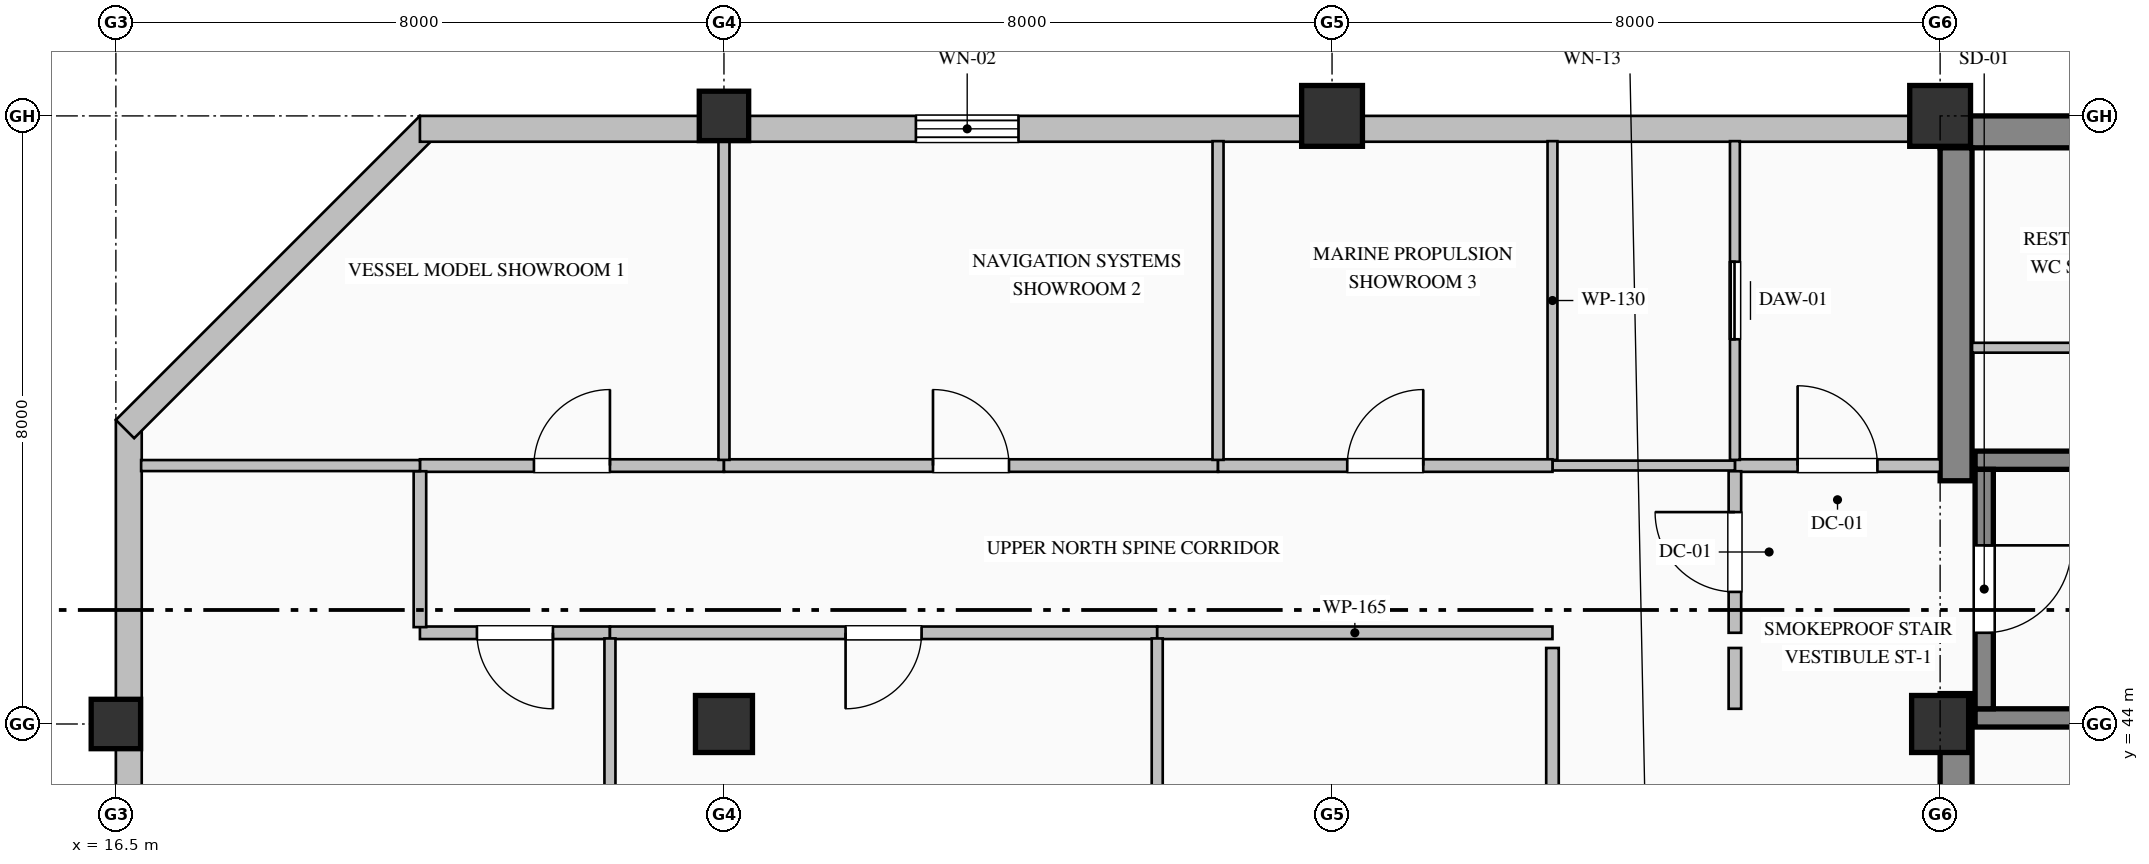
"""IFC4 building model, lengths in metres.
Left out: names, types, materials, properties, quantities, classifications, styles, units other than length and angle.
Written with IfcOpenShell. Run it as: python <this file> out.ifc"""

import sys

from ifc_helpers import new_model, si_unit, direction, frame, frame_2d, origin, origin_2d, place, context, subcontext, project, spatial, rectangle, hollow_rectangle, extrude, element, fill, save


model = new_model("IFC4")
c1 = context("Model", 3, precision=1e-05, world=origin(), true_north=direction((0.0, 1.0)))
c2 = subcontext(c1, "Body", "Model", "MODEL_VIEW")
j1 = project(units=[si_unit("LENGTHUNIT", "METRE"), si_unit("PLANEANGLEUNIT", "RADIAN")], contexts=[c1])
p1 = place(None, origin())
s1 = spatial("IfcSite", under=j1, at=p1, CompositionType="ELEMENT")
p2 = place(p1, origin())
s2 = spatial("IfcBuilding", under=s1, at=p2, CompositionType="ELEMENT")
p3 = place(p2, frame((0.0, 0.0, 355.2)))
s3 = spatial("IfcBuildingStorey", under=s2, at=p3, CompositionType="ELEMENT", Elevation=355.2)
p4 = place(p3, frame((40.5, 51.79, 0.0), z_axis=(0.0, 0.0, 1.0), x_axis=(1.0, 0.0, 0.0)))
e1 = element("IfcWall", 1, at=p4, inside=s3, PredefinedType="SHEAR", context=c2, shape_type="SweptSolid", body=[
    extrude(rectangle(XDim=23.5, YDim=0.42, at=frame_2d((11.75, 0.0))), origin(), (0.0, 0.0, 1.0), 3.785),
])
p5 = place(p3, frame((40.71, 36.42, 0.0), z_axis=(0.0, 0.0, 1.0), x_axis=(0.0, 1.0, 0.0)))
e2 = element("IfcWall", 2, at=p5, inside=s3, PredefinedType="SHEAR", context=c2, shape_type="SweptSolid", body=[
    extrude(rectangle(XDim=7.98, YDim=0.42, at=frame_2d((3.99, 0.0))), origin(), (0.0, 0.0, 1.0), 3.785),
])
p6 = place(p3, frame((40.71, 47.2, 0.0), z_axis=(0.0, 0.0, 1.0), x_axis=(0.0, 1.0, 0.0)))
e3 = element("IfcWall", 3, at=p6, inside=s3, PredefinedType="SHEAR", context=c2, shape_type="SweptSolid", body=[
    extrude(rectangle(XDim=4.38, YDim=0.42, at=frame_2d((2.19, 0.0))), origin(), (0.0, 0.0, 1.0), 3.785),
])
p7 = place(p3, frame((16.5, 44.0, 0.0), z_axis=(0.0, 0.0, 1.0), x_axis=(1.0, 0.0, 0.0)))
e4 = element("IfcColumn", 4, at=p7, inside=s3, PredefinedType="COLUMN", context=c2, shape_type="SweptSolid", body=[
    extrude(hollow_rectangle(XDim=0.65, YDim=0.65, WallThickness=0.028, at=origin_2d()), origin(), (0.0, 0.0, 1.0), 4.0),
])
p8 = place(p3, frame((24.5, 44.0, 0.0), z_axis=(0.0, 0.0, 1.0), x_axis=(1.0, 0.0, 0.0)))
e5 = element("IfcColumn", 5, at=p8, inside=s3, PredefinedType="COLUMN", context=c2, shape_type="SweptSolid", body=[
    extrude(rectangle(XDim=0.75, YDim=0.75, at=origin_2d()), origin(), (0.0, 0.0, 1.0), 4.0),
])
p9 = place(p3, frame((24.5, 52.0, 0.0), z_axis=(0.0, 0.0, 1.0), x_axis=(1.0, 0.0, 0.0)))
e6 = element("IfcColumn", 6, at=p9, inside=s3, PredefinedType="COLUMN", context=c2, shape_type="SweptSolid", body=[
    extrude(hollow_rectangle(XDim=0.65, YDim=0.65, WallThickness=0.028, at=origin_2d()), origin(), (0.0, 0.0, 1.0), 4.0),
])
p10 = place(p3, frame((32.5, 52.0, 0.0), z_axis=(0.0, 0.0, 1.0), x_axis=(1.0, 0.0, 0.0)))
e7 = element("IfcColumn", 7, at=p10, inside=s3, PredefinedType="COLUMN", context=c2, shape_type="SweptSolid", body=[
    extrude(hollow_rectangle(XDim=0.8, YDim=0.8, WallThickness=0.032, at=origin_2d()), origin(), (0.0, 0.0, 1.0), 4.0),
])
p11 = place(p3, frame((40.5, 44.0, 0.0), z_axis=(0.0, 0.0, 1.0), x_axis=(1.0, 0.0, 0.0)))
e8 = element("IfcColumn", 8, at=p11, inside=s3, PredefinedType="COLUMN", context=c2, shape_type="SweptSolid", body=[
    extrude(rectangle(XDim=0.75, YDim=0.75, at=origin_2d()), origin(), (0.0, 0.0, 1.0), 4.0),
])
p12 = place(p3, frame((40.5, 52.0, 0.0), z_axis=(0.0, 0.0, 1.0), x_axis=(1.0, 0.0, 0.0)))
e9 = element("IfcColumn", 9, at=p12, inside=s3, PredefinedType="COLUMN", context=c2, shape_type="SweptSolid", body=[
    extrude(hollow_rectangle(XDim=0.8, YDim=0.8, WallThickness=0.032, at=origin_2d()), origin(), (0.0, 0.0, 1.0), 4.0),
])
p13 = place(p3, frame((16.67, 32.0, 0.0), z_axis=(0.0, 0.0, 1.0), x_axis=(0.0, 1.0, 0.0)))
e10 = element("IfcWall", 10, at=p13, inside=s3, PredefinedType="SOLIDWALL", context=c2, shape_type="SweptSolid", body=[
    extrude(rectangle(XDim=16.0, YDim=0.34, at=frame_2d((8.0, 0.0))), origin(), (0.0, 0.0, 1.0), 3.335),
])
p14 = place(p13, frame((6.725, 0.0, 0.9)))
e11 = element("IfcOpeningElement", 11, at=p14, cuts=e10, PredefinedType="OPENING", context=c2, shape_type="SweptSolid", body=[
    extrude(rectangle(XDim=0.95, YDim=1.85, at=frame_2d((0.475, 0.925))), frame((0.0, 0.18, 0.0), z_axis=(0.0, -1.0, 0.0), x_axis=(1.0, 0.0, 0.0)), (0.0, 0.0, 1.0), 0.36),
])
p15 = place(p3, frame((16.62, 47.88, 0.0), z_axis=(0.0, 0.0, 1.0), x_axis=(0.707106781187, 0.707106781187, 0.0)))
e12 = element("IfcWall", 12, at=p15, inside=s3, PredefinedType="SOLIDWALL", context=c2, shape_type="SweptSolid", body=[
    extrude(rectangle(XDim=5.657, YDim=0.34, at=frame_2d((2.828, 0.0))), origin(), (0.0, 0.0, 1.0), 3.785),
])
p16 = place(p3, frame((20.5, 51.83, 0.0), z_axis=(0.0, 0.0, 1.0), x_axis=(1.0, 0.0, 0.0)))
e13 = element("IfcWall", 13, at=p16, inside=s3, PredefinedType="SOLIDWALL", context=c2, shape_type="SweptSolid", body=[
    extrude(rectangle(XDim=20.02, YDim=0.34, at=frame_2d((10.01, 0.0))), origin(), (0.0, 0.0, 1.0), 3.335),
])
p17 = place(p16, frame((6.525, 0.0, 0.9)))
e14 = element("IfcOpeningElement", 14, at=p17, cuts=e13, PredefinedType="OPENING", context=c2, shape_type="SweptSolid", body=[
    extrude(rectangle(XDim=1.35, YDim=1.85, at=frame_2d((0.675, 0.925))), frame((0.0, 0.18, 0.0), z_axis=(0.0, -1.0, 0.0), x_axis=(1.0, 0.0, 0.0)), (0.0, 0.0, 1.0), 0.36),
])
for number, where, z_axis, x_axis in (
    (15, (40.96, 47.47, 0.0), (0.0, 0.0, 1.0), (1.0, 0.0, 0.0)),
    (16, (49.04, 44.08, 0.0), (0.0, 0.0, 1.0), (-1.0, 0.0, 0.0)),
):
    element("IfcWall", number, at=place(p3, frame(where, z_axis=z_axis, x_axis=x_axis)), inside=s3, PredefinedType="SOLIDWALL", context=c2, shape_type="SweptSolid", body=[
        extrude(rectangle(XDim=8.08, YDim=0.24, at=frame_2d((4.04, 0.0))), origin(), (0.0, 0.0, 1.0), 4.0),
    ])
p18 = place(p3, frame((41.08, 47.35, 0.0), z_axis=(0.0, 0.0, 1.0), x_axis=(0.0, -1.0, 0.0)))
e17 = element("IfcWall", 17, at=p18, inside=s3, PredefinedType="SOLIDWALL", context=c2, shape_type="SweptSolid", body=[
    extrude(rectangle(XDim=3.15, YDim=0.24, at=frame_2d((1.575, 0.0))), origin(), (0.0, 0.0, 1.0), 4.0),
])
p19 = place(p18, frame((1.0, 0.0, 0.0)))
e18 = element("IfcOpeningElement", 18, at=p19, cuts=e17, PredefinedType="OPENING", context=c2, shape_type="SweptSolid", body=[
    extrude(rectangle(XDim=1.15, YDim=2.2, at=frame_2d((0.575, 1.1))), frame((0.0, 0.13, 0.0), z_axis=(0.0, -1.0, 0.0), x_axis=(1.0, 0.0, 0.0)), (0.0, 0.0, 1.0), 0.26),
])
p20 = place(p3, frame((37.8, 47.4, 0.0), z_axis=(0.0, 0.0, 1.0), x_axis=(1.0, 0.0, 0.0)))
e19 = element("IfcWall", 19, at=p20, inside=s3, PredefinedType="PARTITIONING", context=c2, shape_type="SweptSolid", body=[
    extrude(rectangle(XDim=2.7, YDim=0.165, at=frame_2d((1.35, 0.0))), origin(), (0.0, 0.0, 1.0), 3.785),
])
p21 = place(p20, frame((0.825, 0.0, 0.0)))
e20 = element("IfcOpeningElement", 20, at=p21, cuts=e19, PredefinedType="OPENING", context=c2, shape_type="SweptSolid", body=[
    extrude(rectangle(XDim=1.05, YDim=2.15, at=frame_2d((0.525, 1.075))), frame((0.0, 0.093, 0.0), z_axis=(0.0, -1.0, 0.0), x_axis=(1.0, 0.0, 0.0)), (0.0, 0.0, 1.0), 0.185),
])
p22 = place(p3, frame((37.8, 45.2, 0.0), z_axis=(0.0, 0.0, 1.0), x_axis=(0.0, 1.0, 0.0)))
e21 = element("IfcWall", 21, at=p22, inside=s3, PredefinedType="PARTITIONING", context=c2, shape_type="SweptSolid", body=[
    extrude(rectangle(XDim=2.125, YDim=0.165, at=frame_2d((1.063, 0.0))), origin(), (0.0, 0.0, 1.0), 3.785),
])
p23 = place(p22, frame((0.538, 0.0, 0.0)))
e22 = element("IfcOpeningElement", 22, at=p23, cuts=e21, PredefinedType="OPENING", context=c2, shape_type="SweptSolid", body=[
    extrude(rectangle(XDim=1.05, YDim=2.15, at=frame_2d((0.525, 1.075))), frame((0.0, 0.093, 0.0), z_axis=(0.0, -1.0, 0.0), x_axis=(1.0, 0.0, 0.0)), (0.0, 0.0, 1.0), 0.185),
])
p24 = place(p3, frame((37.8, 44.2, 0.0), z_axis=(0.0, 0.0, 1.0), x_axis=(0.0, 1.0, 0.0)))
e23 = element("IfcWall", 23, at=p24, inside=s3, PredefinedType="PARTITIONING", context=c2, shape_type="SweptSolid", body=[
    extrude(rectangle(XDim=0.8, YDim=0.165, at=frame_2d((0.4, 0.0))), origin(), (0.0, 0.0, 1.0), 3.785),
])
p25 = place(p3, frame((37.8, 47.475, 0.0), z_axis=(0.0, 0.0, 1.0), x_axis=(0.0, 1.0, 0.0)))
e24 = element("IfcWall", 24, at=p25, inside=s3, PredefinedType="PARTITIONING", context=c2, shape_type="SweptSolid", body=[
    extrude(rectangle(XDim=4.193, YDim=0.13, at=frame_2d((2.097, 0.0))), origin(), (0.0, 0.0, 1.0), 3.785),
])
p26 = place(p25, frame((1.587, 0.0, 0.0)))
e25 = element("IfcOpeningElement", 25, at=p26, cuts=e24, PredefinedType="OPENING", context=c2, shape_type="SweptSolid", body=[
    extrude(rectangle(XDim=1.02, YDim=2.15, at=frame_2d((0.51, 1.075))), frame((0.0, 0.075, 0.0), z_axis=(0.0, -1.0, 0.0), x_axis=(1.0, 0.0, 0.0)), (0.0, 0.0, 1.0), 0.15),
])
p27 = place(p3, frame((37.8, 47.4, 0.0), z_axis=(0.0, 0.0, 1.0), x_axis=(-1.0, 0.0, 0.0)))
e26 = element("IfcWall", 26, at=p27, inside=s3, PredefinedType="PARTITIONING", context=c2, shape_type="SweptSolid", body=[
    extrude(rectangle(XDim=2.4, YDim=0.13, at=frame_2d((1.2, 0.0))), origin(), (0.0, 0.0, 1.0), 3.785),
])
p28 = place(p3, frame((35.4, 47.475, 0.0), z_axis=(0.0, 0.0, 1.0), x_axis=(0.0, 1.0, 0.0)))
e27 = element("IfcWall", 27, at=p28, inside=s3, PredefinedType="PARTITIONING", context=c2, shape_type="SweptSolid", body=[
    extrude(rectangle(XDim=4.193, YDim=0.13, at=frame_2d((2.097, 0.0))), origin(), (0.0, 0.0, 1.0), 3.785),
])
p29 = place(p3, frame((40.92, 48.95, 0.0), z_axis=(0.0, 0.0, 1.0), x_axis=(1.0, 0.0, 0.0)))
e28 = element("IfcWall", 28, at=p29, inside=s3, PredefinedType="PARTITIONING", context=c2, shape_type="SweptSolid", body=[
    extrude(rectangle(XDim=5.88, YDim=0.13, at=frame_2d((2.94, 0.0))), origin(), (0.0, 0.0, 1.0), 3.785),
])
p30 = place(p29, frame((2.48, 0.0, 0.0)))
e29 = element("IfcOpeningElement", 29, at=p30, cuts=e28, PredefinedType="OPENING", context=c2, shape_type="SweptSolid", body=[
    extrude(rectangle(XDim=0.92, YDim=2.15, at=frame_2d((0.46, 1.075))), frame((0.0, 0.075, 0.0), z_axis=(0.0, -1.0, 0.0), x_axis=(1.0, 0.0, 0.0)), (0.0, 0.0, 1.0), 0.15),
])
p31 = place(p3, frame((20.5, 47.4, 0.0), z_axis=(0.0, 0.0, 1.0), x_axis=(1.0, 0.0, 0.0)))
e30 = element("IfcWall", 30, at=p31, inside=s3, PredefinedType="PARTITIONING", context=c2, shape_type="SweptSolid", body=[
    extrude(rectangle(XDim=4.0, YDim=0.165, at=frame_2d((2.0, 0.0))), origin(), (0.0, 0.0, 1.0), 3.785),
])
p32 = place(p31, frame((1.5, 0.0, 0.0)))
e31 = element("IfcOpeningElement", 31, at=p32, cuts=e30, PredefinedType="OPENING", context=c2, shape_type="SweptSolid", body=[
    extrude(rectangle(XDim=1.0, YDim=2.15, at=frame_2d((0.5, 1.075))), frame((0.0, 0.093, 0.0), z_axis=(0.0, -1.0, 0.0), x_axis=(1.0, 0.0, 0.0)), (0.0, 0.0, 1.0), 0.185),
])
p33 = place(p3, frame((24.5, 47.4, 0.0), z_axis=(0.0, 0.0, 1.0), x_axis=(1.0, 0.0, 0.0)))
e32 = element("IfcWall", 32, at=p33, inside=s3, PredefinedType="PARTITIONING", context=c2, shape_type="SweptSolid", body=[
    extrude(rectangle(XDim=6.5, YDim=0.165, at=frame_2d((3.25, 0.0))), origin(), (0.0, 0.0, 1.0), 3.785),
])
p34 = place(p33, frame((2.75, 0.0, 0.0)))
e33 = element("IfcOpeningElement", 33, at=p34, cuts=e32, PredefinedType="OPENING", context=c2, shape_type="SweptSolid", body=[
    extrude(rectangle(XDim=1.0, YDim=2.15, at=frame_2d((0.5, 1.075))), frame((0.0, 0.093, 0.0), z_axis=(0.0, -1.0, 0.0), x_axis=(1.0, 0.0, 0.0)), (0.0, 0.0, 1.0), 0.185),
])
p35 = place(p3, frame((31.0, 47.4, 0.0), z_axis=(0.0, 0.0, 1.0), x_axis=(1.0, 0.0, 0.0)))
e34 = element("IfcWall", 34, at=p35, inside=s3, PredefinedType="PARTITIONING", context=c2, shape_type="SweptSolid", body=[
    extrude(rectangle(XDim=4.4, YDim=0.165, at=frame_2d((2.2, 0.0))), origin(), (0.0, 0.0, 1.0), 3.785),
])
p36 = place(p35, frame((1.7, 0.0, 0.0)))
e35 = element("IfcOpeningElement", 35, at=p36, cuts=e34, PredefinedType="OPENING", context=c2, shape_type="SweptSolid", body=[
    extrude(rectangle(XDim=1.0, YDim=2.15, at=frame_2d((0.5, 1.075))), frame((0.0, 0.093, 0.0), z_axis=(0.0, -1.0, 0.0), x_axis=(1.0, 0.0, 0.0)), (0.0, 0.0, 1.0), 0.185),
])
p37 = place(p3, frame((23.0, 45.2, 0.0), z_axis=(0.0, 0.0, 1.0), x_axis=(-1.0, 0.0, 0.0)))
e36 = element("IfcWall", 36, at=p37, inside=s3, PredefinedType="PARTITIONING", context=c2, shape_type="SweptSolid", body=[
    extrude(rectangle(XDim=2.5, YDim=0.165, at=frame_2d((1.25, 0.0))), origin(), (0.0, 0.0, 1.0), 3.785),
])
p38 = place(p37, frame((0.75, 0.0, 0.0)))
e37 = element("IfcOpeningElement", 37, at=p38, cuts=e36, PredefinedType="OPENING", context=c2, shape_type="SweptSolid", body=[
    extrude(rectangle(XDim=1.0, YDim=2.15, at=frame_2d((0.5, 1.075))), frame((0.0, 0.093, 0.0), z_axis=(0.0, -1.0, 0.0), x_axis=(1.0, 0.0, 0.0)), (0.0, 0.0, 1.0), 0.185),
])
p39 = place(p3, frame((20.5, 45.274, 0.0), z_axis=(0.0, 0.0, 1.0), x_axis=(0.0, 1.0, 0.0)))
e38 = element("IfcWall", 38, at=p39, inside=s3, PredefinedType="PARTITIONING", context=c2, shape_type="SweptSolid", body=[
    extrude(rectangle(XDim=2.051, YDim=0.165, at=frame_2d((1.025, 0.0))), origin(), (0.0, 0.0, 1.0), 3.785),
])
p40 = place(p3, frame((30.2, 45.2, 0.0), z_axis=(0.0, 0.0, 1.0), x_axis=(-1.0, 0.0, 0.0)))
e39 = element("IfcWall", 39, at=p40, inside=s3, PredefinedType="PARTITIONING", context=c2, shape_type="SweptSolid", body=[
    extrude(rectangle(XDim=7.2, YDim=0.165, at=frame_2d((3.6, 0.0))), origin(), (0.0, 0.0, 1.0), 3.785),
])
p41 = place(p40, frame((3.1, 0.0, 0.0)))
e40 = element("IfcOpeningElement", 40, at=p41, cuts=e39, PredefinedType="OPENING", context=c2, shape_type="SweptSolid", body=[
    extrude(rectangle(XDim=1.0, YDim=2.15, at=frame_2d((0.5, 1.075))), frame((0.0, 0.093, 0.0), z_axis=(0.0, -1.0, 0.0), x_axis=(1.0, 0.0, 0.0)), (0.0, 0.0, 1.0), 0.185),
])
p42 = place(p3, frame((35.4, 45.2, 0.0), z_axis=(0.0, 0.0, 1.0), x_axis=(-1.0, 0.0, 0.0)))
e41 = element("IfcWall", 41, at=p42, inside=s3, PredefinedType="PARTITIONING", context=c2, shape_type="SweptSolid", body=[
    extrude(rectangle(XDim=5.2, YDim=0.165, at=frame_2d((2.6, 0.0))), origin(), (0.0, 0.0, 1.0), 3.785),
])
p43 = place(p3, frame((35.4, 33.6, 0.0), z_axis=(0.0, 0.0, 1.0), x_axis=(0.0, 1.0, 0.0)))
e42 = element("IfcWall", 42, at=p43, inside=s3, PredefinedType="PARTITIONING", context=c2, shape_type="SweptSolid", body=[
    extrude(rectangle(XDim=11.4, YDim=0.165, at=frame_2d((5.7, 0.0))), origin(), (0.0, 0.0, 1.0), 3.785),
])
p44 = place(p43, frame((5.2, 0.0, 0.0)))
e43 = element("IfcOpeningElement", 43, at=p44, cuts=e42, PredefinedType="OPENING", context=c2, shape_type="SweptSolid", body=[
    extrude(rectangle(XDim=1.0, YDim=2.15, at=frame_2d((0.5, 1.075))), frame((0.0, 0.093, 0.0), z_axis=(0.0, -1.0, 0.0), x_axis=(1.0, 0.0, 0.0)), (0.0, 0.0, 1.0), 0.185),
])
p45 = place(p3, frame((24.5, 51.668, 0.0), z_axis=(0.0, 0.0, 1.0), x_axis=(0.0, -1.0, 0.0)))
e44 = element("IfcWall", 44, at=p45, inside=s3, PredefinedType="PARTITIONING", context=c2, shape_type="SweptSolid", body=[
    extrude(rectangle(XDim=4.193, YDim=0.145, at=frame_2d((2.097, 0.0))), origin(), (0.0, 0.0, 1.0), 3.177),
])
p46 = place(p3, frame((20.5, 47.4, 0.0), z_axis=(0.0, 0.0, 1.0), x_axis=(-1.0, 0.0, 0.0)))
e45 = element("IfcWall", 45, at=p46, inside=s3, PredefinedType="PARTITIONING", context=c2, shape_type="SweptSolid", body=[
    extrude(rectangle(XDim=3.668, YDim=0.145, at=frame_2d((1.834, 0.0))), origin(), (0.0, 0.0, 1.0), 3.785),
])
p47 = place(p3, frame((31.0, 51.668, 0.0), z_axis=(0.0, 0.0, 1.0), x_axis=(0.0, -1.0, 0.0)))
e46 = element("IfcWall", 46, at=p47, inside=s3, PredefinedType="PARTITIONING", context=c2, shape_type="SweptSolid", body=[
    extrude(rectangle(XDim=4.193, YDim=0.145, at=frame_2d((2.097, 0.0))), origin(), (0.0, 0.0, 1.0), 3.785),
])
for number, where, z_axis, x_axis in (
    (47, (23.0, 45.125, 0.0), (0.0, 0.0, 1.0), (0.0, -1.0, 0.0)),
    (48, (30.2, 45.125, 0.0), (0.0, 0.0, 1.0), (0.0, -1.0, 0.0)),
):
    element("IfcWall", number, at=place(p3, frame(where, z_axis=z_axis, x_axis=x_axis)), inside=s3, PredefinedType="PARTITIONING", context=c2, shape_type="SweptSolid", body=[
        extrude(rectangle(XDim=16.793, YDim=0.145, at=frame_2d((8.397, 0.0))), origin(), (0.0, 0.0, 1.0), 3.785),
    ])
p48 = place(p17, origin())
e49 = element("IfcWindow", 49, at=p48, inside=s3, PartitioningType="DOUBLE_PANEL_VERTICAL", PredefinedType="WINDOW", context=c2, shape_type="SweptSolid", body=[
    extrude(rectangle(XDim=1.35, YDim=1.85, at=frame_2d((0.675, 0.925))), frame((0.0, 0.15, 0.0), z_axis=(0.0, -1.0, 0.0), x_axis=(1.0, 0.0, 0.0)), (0.0, 0.0, 1.0), 0.06),
])
fill(e14, e49)
p49 = place(p19, origin())
e50 = element("IfcDoor", 50, at=p49, inside=s3, OperationType="SINGLE_SWING_LEFT", PredefinedType="DOOR", context=c2, shape_type="SweptSolid", body=[
    extrude(rectangle(XDim=1.15, YDim=2.2, at=frame_2d((0.575, 1.1))), frame((0.0, 0.025, 0.0), z_axis=(0.0, -1.0, 0.0), x_axis=(1.0, 0.0, 0.0)), (0.0, 0.0, 1.0), 0.05),
])
fill(e18, e50)
p50 = place(p21, origin())
e51 = element("IfcDoor", 51, at=p50, inside=s3, OperationType="SINGLE_SWING_LEFT", PredefinedType="DOOR", context=c2, shape_type="SweptSolid", body=[
    extrude(rectangle(XDim=1.05, YDim=2.15, at=frame_2d((0.525, 1.075))), frame((0.0, 0.025, 0.0), z_axis=(0.0, -1.0, 0.0), x_axis=(1.0, 0.0, 0.0)), (0.0, 0.0, 1.0), 0.05),
])
fill(e20, e51)
p51 = place(p23, origin())
e52 = element("IfcDoor", 52, at=p51, inside=s3, OperationType="SINGLE_SWING_RIGHT", PredefinedType="DOOR", context=c2, shape_type="SweptSolid", body=[
    extrude(rectangle(XDim=1.05, YDim=2.15, at=frame_2d((0.525, 1.075))), frame((0.0, 0.025, 0.0), z_axis=(0.0, -1.0, 0.0), x_axis=(1.0, 0.0, 0.0)), (0.0, 0.0, 1.0), 0.05),
])
fill(e22, e52)
p52 = place(p26, origin())
e53 = element("IfcDoor", 53, at=p52, inside=s3, OperationType="SLIDING_TO_LEFT", PredefinedType="DOOR", context=c2, shape_type="SweptSolid", body=[
    extrude(rectangle(XDim=1.02, YDim=2.15, at=frame_2d((0.51, 1.075))), frame((0.0, 0.025, 0.0), z_axis=(0.0, -1.0, 0.0), x_axis=(1.0, 0.0, 0.0)), (0.0, 0.0, 1.0), 0.05),
])
fill(e25, e53)
p53 = place(p32, origin())
e54 = element("IfcDoor", 54, at=p53, inside=s3, OperationType="SINGLE_SWING_RIGHT", PredefinedType="DOOR", context=c2, shape_type="SweptSolid", body=[
    extrude(rectangle(XDim=1.0, YDim=2.15, at=frame_2d((0.5, 1.075))), frame((0.0, 0.025, 0.0), z_axis=(0.0, -1.0, 0.0), x_axis=(1.0, 0.0, 0.0)), (0.0, 0.0, 1.0), 0.05),
])
fill(e31, e54)
p54 = place(p34, origin())
e55 = element("IfcDoor", 55, at=p54, inside=s3, OperationType="SINGLE_SWING_LEFT", PredefinedType="DOOR", context=c2, shape_type="SweptSolid", body=[
    extrude(rectangle(XDim=1.0, YDim=2.15, at=frame_2d((0.5, 1.075))), frame((0.0, 0.025, 0.0), z_axis=(0.0, -1.0, 0.0), x_axis=(1.0, 0.0, 0.0)), (0.0, 0.0, 1.0), 0.05),
])
fill(e33, e55)
p55 = place(p36, origin())
e56 = element("IfcDoor", 56, at=p55, inside=s3, OperationType="SINGLE_SWING_RIGHT", PredefinedType="DOOR", context=c2, shape_type="SweptSolid", body=[
    extrude(rectangle(XDim=1.0, YDim=2.15, at=frame_2d((0.5, 1.075))), frame((0.0, 0.025, 0.0), z_axis=(0.0, -1.0, 0.0), x_axis=(1.0, 0.0, 0.0)), (0.0, 0.0, 1.0), 0.05),
])
fill(e35, e56)
p56 = place(p38, origin())
e57 = element("IfcDoor", 57, at=p56, inside=s3, OperationType="SINGLE_SWING_LEFT", PredefinedType="DOOR", context=c2, shape_type="SweptSolid", body=[
    extrude(rectangle(XDim=1.0, YDim=2.15, at=frame_2d((0.5, 1.075))), frame((0.0, 0.025, 0.0), z_axis=(0.0, -1.0, 0.0), x_axis=(1.0, 0.0, 0.0)), (0.0, 0.0, 1.0), 0.05),
])
fill(e37, e57)
p57 = place(p41, origin())
e58 = element("IfcDoor", 58, at=p57, inside=s3, OperationType="SINGLE_SWING_RIGHT", PredefinedType="DOOR", context=c2, shape_type="SweptSolid", body=[
    extrude(rectangle(XDim=1.0, YDim=2.15, at=frame_2d((0.5, 1.075))), frame((0.0, 0.025, 0.0), z_axis=(0.0, -1.0, 0.0), x_axis=(1.0, 0.0, 0.0)), (0.0, 0.0, 1.0), 0.05),
])
fill(e40, e58)
save(model, sys.argv[1])
